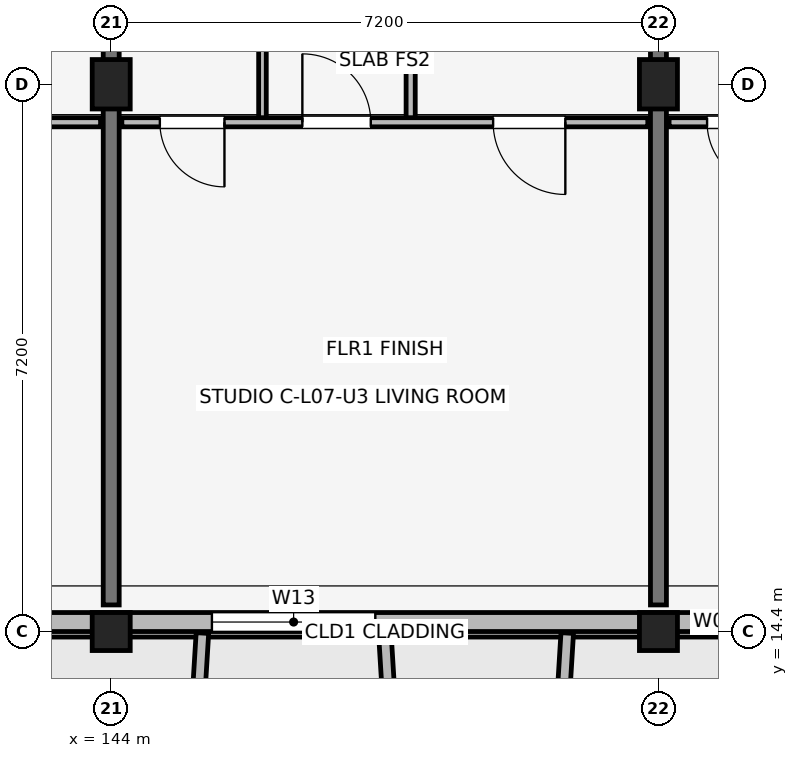
"""IFC4 building model, lengths in metres.
Left out: names, types, materials, properties, quantities, classifications, styles, units other than length and angle.
Written with IfcOpenShell. Run it as: python <this file> out.ifc"""

import sys

from ifc_helpers import new_model, si_unit, direction, frame, frame_2d, origin, origin_2d, place, context, subcontext, project, spatial, rectangle, extrude, element, fill, save


model = new_model("IFC4")
c1 = context("Model", 3, precision=1e-05, world=origin(), true_north=direction((0.0, 1.0)))
c2 = subcontext(c1, "Body", "Model", "MODEL_VIEW")
j1 = project(units=[si_unit("LENGTHUNIT", "METRE"), si_unit("PLANEANGLEUNIT", "RADIAN")], contexts=[c1])
p1 = place(None, origin())
s1 = spatial("IfcSite", under=j1, at=p1, CompositionType="ELEMENT")
p2 = place(p1, origin())
s2 = spatial("IfcBuilding", under=s1, at=p2, CompositionType="ELEMENT")
p3 = place(p2, frame((0.0, 0.0, 24.45)))
s3 = spatial("IfcBuildingStorey", under=s2, at=p3, CompositionType="ELEMENT", Elevation=24.45)
p4 = place(p3, frame((144.0, 14.4, 0.0), z_axis=(0.0, 0.0, 1.0), x_axis=(1.0, 0.0, 0.0)))
e1 = element("IfcColumn", 1, at=p4, inside=s3, PredefinedType="COLUMN", context=c2, shape_type="SweptSolid", body=[
    extrude(rectangle(XDim=0.5, YDim=0.5, at=origin_2d()), origin(), (0.0, 0.0, 1.0), 3.15),
])
p5 = place(p3, frame((144.0, 21.6, 0.0), z_axis=(0.0, 0.0, 1.0), x_axis=(1.0, 0.0, 0.0)))
e2 = element("IfcColumn", 2, at=p5, inside=s3, PredefinedType="COLUMN", context=c2, shape_type="SweptSolid", body=[
    extrude(rectangle(XDim=0.5, YDim=0.65, at=origin_2d()), origin(), (0.0, 0.0, 1.0), 3.15),
])
p6 = place(p3, frame((151.2, 14.4, 0.0), z_axis=(0.0, 0.0, 1.0), x_axis=(1.0, 0.0, 0.0)))
e3 = element("IfcColumn", 3, at=p6, inside=s3, PredefinedType="COLUMN", context=c2, shape_type="SweptSolid", body=[
    extrude(rectangle(XDim=0.5, YDim=0.5, at=origin_2d()), origin(), (0.0, 0.0, 1.0), 3.15),
])
p7 = place(p3, frame((151.2, 21.6, 0.0), z_axis=(0.0, 0.0, 1.0), x_axis=(1.0, 0.0, 0.0)))
e4 = element("IfcColumn", 4, at=p7, inside=s3, PredefinedType="COLUMN", context=c2, shape_type="SweptSolid", body=[
    extrude(rectangle(XDim=0.5, YDim=0.65, at=origin_2d()), origin(), (0.0, 0.0, 1.0), 3.15),
])
for number, where, z_axis, x_axis in (
    (5, (144.0, 14.75, 0.0), (0.0, 0.0, 1.0), (0.0, 1.0, 0.0)),
    (6, (151.2, 14.75, 0.0), (0.0, 0.0, 1.0), (0.0, 1.0, 0.0)),
):
    element("IfcWall", number, at=place(p3, frame(where, z_axis=z_axis, x_axis=x_axis)), inside=s3, PredefinedType="SHEAR", context=c2, shape_type="SweptSolid", body=[
        extrude(rectangle(XDim=9.4, YDim=0.21, at=frame_2d((4.7, 0.0))), origin(), (0.0, 0.0, 1.0), 3.15),
    ])
p8 = place(p3, frame((132.6, 14.525, 0.0), z_axis=(0.0, 0.0, 1.0), x_axis=(1.0, 0.0, 0.0)))
e7 = element("IfcWall", 7, at=p8, inside=s3, PredefinedType="SOLIDWALL", context=c2, shape_type="SweptSolid", body=[
    extrude(rectangle(XDim=30.0, YDim=0.25, at=frame_2d((15.0, 0.0))), origin(), (0.0, 0.0, 1.0), 2.43),
])
p9 = place(p8, frame((9.75, 0.0, 0.0), z_axis=(0.0, 0.0, 1.0), x_axis=(-1.0, 0.0, 0.0)))
e8 = element("IfcOpeningElement", 8, at=p9, cuts=e7, PredefinedType="OPENING", context=c2, shape_type="SweptSolid", body=[
    extrude(rectangle(XDim=1.5, YDim=2.15, at=frame_2d((0.75, 1.075))), frame((0.0, 0.135, 0.0), z_axis=(0.0, -1.0, 0.0), x_axis=(1.0, 0.0, 0.0)), (0.0, 0.0, 1.0), 0.27),
])
p10 = place(p8, frame((24.3, 0.0, 0.0), z_axis=(0.0, 0.0, 1.0), x_axis=(-1.0, 0.0, 0.0)))
e9 = element("IfcOpeningElement", 9, at=p10, cuts=e7, PredefinedType="OPENING", context=c2, shape_type="SweptSolid", body=[
    extrude(rectangle(XDim=1.8, YDim=2.15, at=frame_2d((0.9, 1.075))), frame((0.0, 0.135, 0.0), z_axis=(0.0, -1.0, 0.0), x_axis=(1.0, 0.0, 0.0)), (0.0, 0.0, 1.0), 0.27),
])
p11 = place(p8, frame((1.46, 0.0, 0.75)))
e10 = element("IfcOpeningElement", 10, at=p11, cuts=e7, PredefinedType="OPENING", context=c2, shape_type="SweptSolid", body=[
    extrude(rectangle(XDim=0.85, YDim=1.4, at=frame_2d((0.425, 0.7))), frame((0.0, 0.135, 0.0), z_axis=(0.0, -1.0, 0.0), x_axis=(1.0, 0.0, 0.0)), (0.0, 0.0, 1.0), 0.27),
])
p12 = place(p8, frame((12.725, 0.0, 0.67)))
e11 = element("IfcOpeningElement", 11, at=p12, cuts=e7, PredefinedType="OPENING", context=c2, shape_type="SweptSolid", body=[
    extrude(rectangle(XDim=2.15, YDim=1.65, at=frame_2d((1.075, 0.825))), frame((0.0, 0.135, 0.0), z_axis=(0.0, -1.0, 0.0), x_axis=(1.0, 0.0, 0.0)), (0.0, 0.0, 1.0), 0.27),
])
p13 = place(p8, frame((19.045, 0.0, 0.75)))
e12 = element("IfcOpeningElement", 12, at=p13, cuts=e7, PredefinedType="OPENING", context=c2, shape_type="SweptSolid", body=[
    extrude(rectangle(XDim=0.6, YDim=1.25, at=frame_2d((0.3, 0.625))), frame((0.0, 0.135, 0.0), z_axis=(0.0, -1.0, 0.0), x_axis=(1.0, 0.0, 0.0)), (0.0, 0.0, 1.0), 0.27),
])
p14 = place(p8, frame((26.245, 0.0, 0.75)))
e13 = element("IfcOpeningElement", 13, at=p14, cuts=e7, PredefinedType="OPENING", context=c2, shape_type="SweptSolid", body=[
    extrude(rectangle(XDim=0.6, YDim=1.25, at=frame_2d((0.3, 0.625))), frame((0.0, 0.135, 0.0), z_axis=(0.0, -1.0, 0.0), x_axis=(1.0, 0.0, 0.0)), (0.0, 0.0, 1.0), 0.27),
])
p15 = place(p8, frame((27.93, 0.0, 0.75)))
e14 = element("IfcOpeningElement", 14, at=p15, cuts=e7, PredefinedType="OPENING", context=c2, shape_type="SweptSolid", body=[
    extrude(rectangle(XDim=1.34, YDim=1.55, at=frame_2d((0.67, 0.775))), frame((0.0, 0.135, 0.0), z_axis=(0.0, -1.0, 0.0), x_axis=(1.0, 0.0, 0.0)), (0.0, 0.0, 1.0), 0.27),
])
for number, where, z_axis, x_axis in (
    (15, (145.2, 14.38, 0.0), (0.0, 0.0, 1.0), (-0.061, -0.998, 0.0)),
    (16, (147.6, 14.38, 0.0), (0.0, 0.0, 1.0), (0.061, -0.998, 0.0)),
    (17, (150.0, 14.38, 0.0), (0.0, 0.0, 1.0), (-0.061, -0.998, 0.0)),
):
    element("IfcWall", number, at=place(p3, frame(where, z_axis=z_axis, x_axis=x_axis)), inside=s3, PredefinedType="ELEMENTEDWALL", context=c2, shape_type="SweptSolid", body=[
        extrude(rectangle(XDim=1.964, YDim=0.165, at=frame_2d((0.982, 0.0))), origin(), (0.0, 0.0, 1.0), 2.48),
    ])
p16 = place(p3, frame((136.94, 21.1, 0.0), z_axis=(0.0, 0.0, 1.0), x_axis=(1.0, 0.0, 0.0)))
e18 = element("IfcWall", 18, at=p16, inside=s3, PredefinedType="PARTITIONING", context=c2, shape_type="SweptSolid", body=[
    extrude(rectangle(XDim=6.92, YDim=0.12, at=frame_2d((3.46, 0.0))), origin(), (0.0, 0.0, 1.0), 2.38),
])
p17 = place(p16, frame((1.475, 0.0, 0.0), z_axis=(0.0, 0.0, 1.0), x_axis=(-1.0, 0.0, 0.0)))
e19 = element("IfcOpeningElement", 19, at=p17, cuts=e18, PredefinedType="OPENING", context=c2, shape_type="SweptSolid", body=[
    extrude(rectangle(XDim=0.85, YDim=2.08, at=frame_2d((0.425, 1.04))), frame((0.0, 0.07, 0.0), z_axis=(0.0, -1.0, 0.0), x_axis=(1.0, 0.0, 0.0)), (0.0, 0.0, 1.0), 0.14),
])
p18 = place(p16, frame((2.625, 0.0, 0.0)))
e20 = element("IfcOpeningElement", 20, at=p18, cuts=e18, PredefinedType="OPENING", context=c2, shape_type="SweptSolid", body=[
    extrude(rectangle(XDim=0.9, YDim=2.08, at=frame_2d((0.45, 1.04))), frame((0.0, 0.07, 0.0), z_axis=(0.0, -1.0, 0.0), x_axis=(1.0, 0.0, 0.0)), (0.0, 0.0, 1.0), 0.14),
])
p19 = place(p16, frame((5.96, 0.0, 0.0), z_axis=(0.0, 0.0, 1.0), x_axis=(-1.0, 0.0, 0.0)))
e21 = element("IfcOpeningElement", 21, at=p19, cuts=e18, PredefinedType="OPENING", context=c2, shape_type="SweptSolid", body=[
    extrude(rectangle(XDim=0.95, YDim=2.08, at=frame_2d((0.475, 1.04))), frame((0.0, 0.07, 0.0), z_axis=(0.0, -1.0, 0.0), x_axis=(1.0, 0.0, 0.0)), (0.0, 0.0, 1.0), 0.14),
])
p20 = place(p3, frame((145.99, 21.1, 0.0), z_axis=(0.0, 0.0, 1.0), x_axis=(0.0, 1.0, 0.0)))
e22 = element("IfcWall", 22, at=p20, inside=s3, PredefinedType="PARTITIONING", context=c2, shape_type="SweptSolid", body=[
    extrude(rectangle(XDim=3.2, YDim=0.1, at=frame_2d((1.6, 0.0))), origin(), (0.0, 0.0, 1.0), 2.38),
])
p21 = place(p3, frame((147.94, 21.1, 0.0), z_axis=(0.0, 0.0, 1.0), x_axis=(0.0, 1.0, 0.0)))
e23 = element("IfcWall", 23, at=p21, inside=s3, PredefinedType="PARTITIONING", context=c2, shape_type="SweptSolid", body=[
    extrude(rectangle(XDim=3.2, YDim=0.12, at=frame_2d((1.6, 0.0))), origin(), (0.0, 0.0, 1.0), 2.38),
])
p22 = place(p3, frame((144.14, 21.1, 0.0), z_axis=(0.0, 0.0, 1.0), x_axis=(1.0, 0.0, 0.0)))
e24 = element("IfcWall", 24, at=p22, inside=s3, PredefinedType="PARTITIONING", context=c2, shape_type="SweptSolid", body=[
    extrude(rectangle(XDim=6.92, YDim=0.12, at=frame_2d((3.46, 0.0))), origin(), (0.0, 0.0, 1.0), 2.38),
])
p23 = place(p22, frame((1.35, 0.0, 0.0), z_axis=(0.0, 0.0, 1.0), x_axis=(-1.0, 0.0, 0.0)))
e25 = element("IfcOpeningElement", 25, at=p23, cuts=e24, PredefinedType="OPENING", context=c2, shape_type="SweptSolid", body=[
    extrude(rectangle(XDim=0.85, YDim=2.08, at=frame_2d((0.425, 1.04))), frame((0.0, 0.07, 0.0), z_axis=(0.0, -1.0, 0.0), x_axis=(1.0, 0.0, 0.0)), (0.0, 0.0, 1.0), 0.14),
])
p24 = place(p22, frame((2.375, 0.0, 0.0)))
e26 = element("IfcOpeningElement", 26, at=p24, cuts=e24, PredefinedType="OPENING", context=c2, shape_type="SweptSolid", body=[
    extrude(rectangle(XDim=0.9, YDim=2.08, at=frame_2d((0.45, 1.04))), frame((0.0, 0.07, 0.0), z_axis=(0.0, -1.0, 0.0), x_axis=(1.0, 0.0, 0.0)), (0.0, 0.0, 1.0), 0.14),
])
p25 = place(p22, frame((5.835, 0.0, 0.0), z_axis=(0.0, 0.0, 1.0), x_axis=(-1.0, 0.0, 0.0)))
e27 = element("IfcOpeningElement", 27, at=p25, cuts=e24, PredefinedType="OPENING", context=c2, shape_type="SweptSolid", body=[
    extrude(rectangle(XDim=0.95, YDim=2.08, at=frame_2d((0.475, 1.04))), frame((0.0, 0.07, 0.0), z_axis=(0.0, -1.0, 0.0), x_axis=(1.0, 0.0, 0.0)), (0.0, 0.0, 1.0), 0.14),
])
p26 = place(p3, frame((151.34, 21.1, 0.0), z_axis=(0.0, 0.0, 1.0), x_axis=(1.0, 0.0, 0.0)))
e28 = element("IfcWall", 28, at=p26, inside=s3, PredefinedType="PARTITIONING", context=c2, shape_type="SweptSolid", body=[
    extrude(rectangle(XDim=6.92, YDim=0.12, at=frame_2d((3.46, 0.0))), origin(), (0.0, 0.0, 1.0), 2.38),
])
p27 = place(p26, frame((1.35, 0.0, 0.0), z_axis=(0.0, 0.0, 1.0), x_axis=(-1.0, 0.0, 0.0)))
e29 = element("IfcOpeningElement", 29, at=p27, cuts=e28, PredefinedType="OPENING", context=c2, shape_type="SweptSolid", body=[
    extrude(rectangle(XDim=0.85, YDim=2.08, at=frame_2d((0.425, 1.04))), frame((0.0, 0.07, 0.0), z_axis=(0.0, -1.0, 0.0), x_axis=(1.0, 0.0, 0.0)), (0.0, 0.0, 1.0), 0.14),
])
p28 = place(p26, frame((2.525, 0.0, 0.0)))
e30 = element("IfcOpeningElement", 30, at=p28, cuts=e28, PredefinedType="OPENING", context=c2, shape_type="SweptSolid", body=[
    extrude(rectangle(XDim=0.9, YDim=2.08, at=frame_2d((0.45, 1.04))), frame((0.0, 0.07, 0.0), z_axis=(0.0, -1.0, 0.0), x_axis=(1.0, 0.0, 0.0)), (0.0, 0.0, 1.0), 0.14),
])
p29 = place(p26, frame((5.985, 0.0, 0.0), z_axis=(0.0, 0.0, 1.0), x_axis=(-1.0, 0.0, 0.0)))
e31 = element("IfcOpeningElement", 31, at=p29, cuts=e28, PredefinedType="OPENING", context=c2, shape_type="SweptSolid", body=[
    extrude(rectangle(XDim=0.95, YDim=2.08, at=frame_2d((0.475, 1.04))), frame((0.0, 0.07, 0.0), z_axis=(0.0, -1.0, 0.0), x_axis=(1.0, 0.0, 0.0)), (0.0, 0.0, 1.0), 0.14),
])
p30 = place(p12, origin())
e32 = element("IfcWindow", 32, at=p30, inside=s3, PartitioningType="SINGLE_PANEL", PredefinedType="WINDOW", context=c2, shape_type="SweptSolid", body=[
    extrude(rectangle(XDim=2.15, YDim=1.65, at=frame_2d((1.075, 0.825))), frame((0.0, 0.03, 0.0), z_axis=(0.0, -1.0, 0.0), x_axis=(1.0, 0.0, 0.0)), (0.0, 0.0, 1.0), 0.06),
])
fill(e11, e32)
p31 = place(p13, origin())
e33 = element("IfcWindow", 33, at=p31, inside=s3, PartitioningType="SINGLE_PANEL", PredefinedType="WINDOW", context=c2, shape_type="SweptSolid", body=[
    extrude(rectangle(XDim=0.6, YDim=1.25, at=frame_2d((0.3, 0.625))), frame((0.0, 0.03, 0.0), z_axis=(0.0, -1.0, 0.0), x_axis=(1.0, 0.0, 0.0)), (0.0, 0.0, 1.0), 0.06),
])
fill(e12, e33)
p32 = place(p23, origin())
e34 = element("IfcDoor", 34, at=p32, inside=s3, OperationType="SINGLE_SWING_RIGHT", PredefinedType="DOOR", context=c2, shape_type="SweptSolid", body=[
    extrude(rectangle(XDim=0.85, YDim=2.08, at=frame_2d((0.425, 1.04))), frame((0.0, 0.025, 0.0), z_axis=(0.0, -1.0, 0.0), x_axis=(1.0, 0.0, 0.0)), (0.0, 0.0, 1.0), 0.05),
])
fill(e25, e34)
p33 = place(p24, origin())
e35 = element("IfcDoor", 35, at=p33, inside=s3, OperationType="SINGLE_SWING_LEFT", PredefinedType="DOOR", context=c2, shape_type="SweptSolid", body=[
    extrude(rectangle(XDim=0.9, YDim=2.08, at=frame_2d((0.45, 1.04))), frame((0.0, 0.025, 0.0), z_axis=(0.0, -1.0, 0.0), x_axis=(1.0, 0.0, 0.0)), (0.0, 0.0, 1.0), 0.05),
])
fill(e26, e35)
p34 = place(p25, origin())
e36 = element("IfcDoor", 36, at=p34, inside=s3, OperationType="SINGLE_SWING_RIGHT", PredefinedType="DOOR", context=c2, shape_type="SweptSolid", body=[
    extrude(rectangle(XDim=0.95, YDim=2.08, at=frame_2d((0.475, 1.04))), frame((0.0, 0.025, 0.0), z_axis=(0.0, -1.0, 0.0), x_axis=(1.0, 0.0, 0.0)), (0.0, 0.0, 1.0), 0.05),
])
fill(e27, e36)
p35 = place(p27, origin())
e37 = element("IfcDoor", 37, at=p35, inside=s3, OperationType="SINGLE_SWING_RIGHT", PredefinedType="DOOR", context=c2, shape_type="SweptSolid", body=[
    extrude(rectangle(XDim=0.85, YDim=2.08, at=frame_2d((0.425, 1.04))), frame((0.0, 0.025, 0.0), z_axis=(0.0, -1.0, 0.0), x_axis=(1.0, 0.0, 0.0)), (0.0, 0.0, 1.0), 0.05),
])
fill(e29, e37)
save(model, sys.argv[1])
